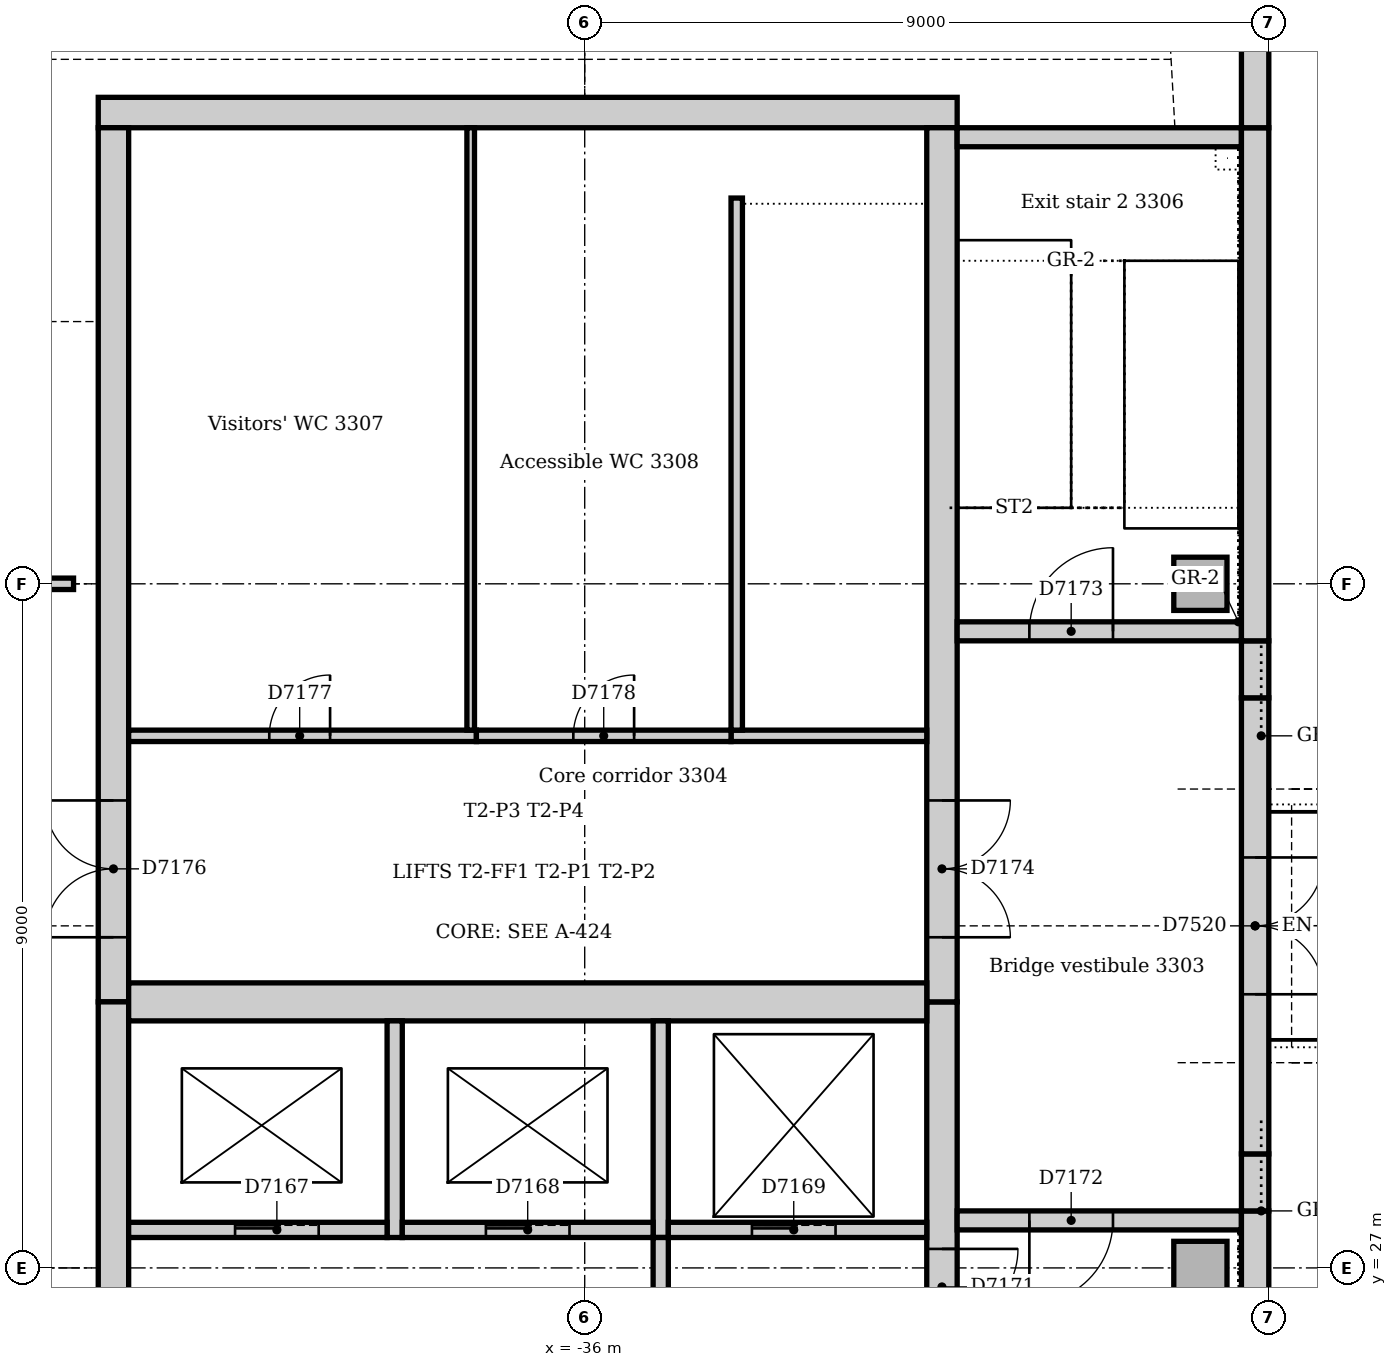
"""IFC4 building model, lengths in metres.
Left out: names, types, materials, properties, quantities, classifications, styles, units other than length and angle.
Written with IfcOpenShell. Run it as: python <this file> out.ifc"""

import sys

from ifc_helpers import new_model, si_unit, direction, frame, frame_2d, origin, origin_2d, place, context, subcontext, project, spatial, rectangle, extrude, element, fill, save


model = new_model("IFC4")
c1 = context("Model", 3, precision=1e-05, world=origin(), true_north=direction((0.0, 1.0)))
c2 = subcontext(c1, "Body", "Model", "MODEL_VIEW")
j1 = project(units=[si_unit("LENGTHUNIT", "METRE"), si_unit("PLANEANGLEUNIT", "RADIAN")], contexts=[c1])
p1 = place(None, origin())
s1 = spatial("IfcSite", under=j1, at=p1, CompositionType="ELEMENT")
p2 = place(p1, origin())
s2 = spatial("IfcBuilding", under=s1, at=p2, CompositionType="ELEMENT")
p3 = place(p2, frame((0.0, 0.0, 140.0)))
s3 = spatial("IfcBuildingStorey", under=s2, at=p3, CompositionType="ELEMENT", Elevation=140.0)
p4 = place(p3, frame((-31.1, 42.2, 0.0), z_axis=(0.0, 0.0, 1.0), x_axis=(-1.0, 0.0, 0.0)))
e1 = element("IfcWall", 1, at=p4, inside=s3, PredefinedType="SOLIDWALL", context=c2, shape_type="SweptSolid", body=[
    extrude(rectangle(XDim=11.3, YDim=0.4, at=frame_2d((5.65, 0.0))), origin(), (0.0, 0.0, 1.0), 3.7),
])
p5 = place(p3, frame((-31.3, 21.0, 0.0), z_axis=(0.0, 0.0, 1.0), x_axis=(0.0, 1.0, 0.0)))
e2 = element("IfcWall", 2, at=p5, inside=s3, PredefinedType="SOLIDWALL", context=c2, shape_type="SweptSolid", body=[
    extrude(rectangle(XDim=9.5, YDim=0.4, at=frame_2d((4.75, 0.0))), origin(), (0.0, 0.0, 1.0), 3.7),
])
p6 = place(p5, frame((5.25, 0.0, 0.0)))
e3 = element("IfcOpeningElement", 3, at=p6, cuts=e2, PredefinedType="OPENING", context=c2, shape_type="SweptSolid", body=[
    extrude(rectangle(XDim=1.0, YDim=2.1, at=frame_2d((0.5, 1.05))), frame((0.0, 0.21, 0.0), z_axis=(0.0, -1.0, 0.0), x_axis=(1.0, 0.0, 0.0)), (0.0, 0.0, 1.0), 0.42),
])
p7 = place(p3, frame((-31.3, 30.5, 0.0), z_axis=(0.0, 0.0, 1.0), x_axis=(0.0, 1.0, 0.0)))
e4 = element("IfcWall", 4, at=p7, inside=s3, PredefinedType="SOLIDWALL", context=c2, shape_type="SweptSolid", body=[
    extrude(rectangle(XDim=11.5, YDim=0.4, at=frame_2d((5.75, 0.0))), origin(), (0.0, 0.0, 1.0), 3.7),
])
p8 = place(p7, frame((0.85, 0.0, 0.0)))
e5 = element("IfcOpeningElement", 5, at=p8, cuts=e4, PredefinedType="OPENING", context=c2, shape_type="SweptSolid", body=[
    extrude(rectangle(XDim=1.8, YDim=2.1, at=frame_2d((0.9, 1.05))), frame((0.0, 0.21, 0.0), z_axis=(0.0, -1.0, 0.0), x_axis=(1.0, 0.0, 0.0)), (0.0, 0.0, 1.0), 0.42),
])
p9 = place(p3, frame((-42.2, 42.0, 0.0), z_axis=(0.0, 0.0, 1.0), x_axis=(0.0, -1.0, 0.0)))
e6 = element("IfcWall", 6, at=p9, inside=s3, PredefinedType="SOLIDWALL", context=c2, shape_type="SweptSolid", body=[
    extrude(rectangle(XDim=11.5, YDim=0.4, at=frame_2d((5.75, 0.0))), origin(), (0.0, 0.0, 1.0), 3.7),
])
p10 = place(p9, frame((8.85, 0.0, 0.0)))
e7 = element("IfcOpeningElement", 7, at=p10, cuts=e6, PredefinedType="OPENING", context=c2, shape_type="SweptSolid", body=[
    extrude(rectangle(XDim=1.8, YDim=2.1, at=frame_2d((0.9, 1.05))), frame((0.0, 0.21, 0.0), z_axis=(0.0, -1.0, 0.0), x_axis=(1.0, 0.0, 0.0)), (0.0, 0.0, 1.0), 0.42),
])
p11 = place(p3, frame((-42.2, 30.5, 0.0), z_axis=(0.0, 0.0, 1.0), x_axis=(0.0, -1.0, 0.0)))
e8 = element("IfcWall", 8, at=p11, inside=s3, PredefinedType="SOLIDWALL", context=c2, shape_type="SweptSolid", body=[
    extrude(rectangle(XDim=9.5, YDim=0.4, at=frame_2d((4.75, 0.0))), origin(), (0.0, 0.0, 1.0), 3.7),
])
p12 = place(p11, frame((3.85, 0.0, 0.0)))
e9 = element("IfcOpeningElement", 9, at=p12, cuts=e8, PredefinedType="OPENING", context=c2, shape_type="SweptSolid", body=[
    extrude(rectangle(XDim=1.8, YDim=2.1, at=frame_2d((0.9, 1.05))), frame((0.0, 0.21, 0.0), z_axis=(0.0, -1.0, 0.0), x_axis=(1.0, 0.0, 0.0)), (0.0, 0.0, 1.0), 0.42),
])
p13 = place(p3, frame((-42.0, 30.5, 0.0), z_axis=(0.0, 0.0, 1.0), x_axis=(1.0, 0.0, 0.0)))
e10 = element("IfcWall", 10, at=p13, inside=s3, PredefinedType="SOLIDWALL", context=c2, shape_type="SweptSolid", body=[
    extrude(rectangle(XDim=10.5, YDim=0.5, at=frame_2d((5.25, 0.0))), origin(), (0.0, 0.0, 1.0), 3.7),
])
p14 = place(p3, frame((-27.36, 27.625, 0.0), z_axis=(0.0, 0.0, 1.0), x_axis=(-1.0, 0.0, 0.0)))
e11 = element("IfcWall", 11, at=p14, inside=s3, PredefinedType="SOLIDWALL", context=c2, shape_type="SweptSolid", body=[
    extrude(rectangle(XDim=3.74, YDim=0.25, at=frame_2d((1.87, 0.0))), origin(), (0.0, 0.0, 1.0), 3.7),
])
p15 = place(p14, frame((1.69, 0.0, 0.0)))
e12 = element("IfcOpeningElement", 12, at=p15, cuts=e11, PredefinedType="OPENING", context=c2, shape_type="SweptSolid", body=[
    extrude(rectangle(XDim=1.1, YDim=2.1, at=frame_2d((0.55, 1.05))), frame((0.0, 0.135, 0.0), z_axis=(0.0, -1.0, 0.0), x_axis=(1.0, 0.0, 0.0)), (0.0, 0.0, 1.0), 0.27),
])
p16 = place(p3, frame((-31.1, 35.375, 0.0), z_axis=(0.0, 0.0, 1.0), x_axis=(1.0, 0.0, 0.0)))
e13 = element("IfcWall", 13, at=p16, inside=s3, PredefinedType="SOLIDWALL", context=c2, shape_type="SweptSolid", body=[
    extrude(rectangle(XDim=3.74, YDim=0.25, at=frame_2d((1.87, 0.0))), origin(), (0.0, 0.0, 1.0), 3.7),
])
p17 = place(p16, frame((0.95, 0.0, 0.0)))
e14 = element("IfcOpeningElement", 14, at=p17, cuts=e13, PredefinedType="OPENING", context=c2, shape_type="SweptSolid", body=[
    extrude(rectangle(XDim=1.1, YDim=2.1, at=frame_2d((0.55, 1.05))), frame((0.0, 0.135, 0.0), z_axis=(0.0, -1.0, 0.0), x_axis=(1.0, 0.0, 0.0)), (0.0, 0.0, 1.0), 0.27),
])
p18 = place(p3, frame((-27.36, 41.875, 0.0), z_axis=(0.0, 0.0, 1.0), x_axis=(-1.0, 0.0, 0.0)))
e15 = element("IfcWall", 15, at=p18, inside=s3, PredefinedType="SOLIDWALL", context=c2, shape_type="SweptSolid", body=[
    extrude(rectangle(XDim=3.74, YDim=0.25, at=frame_2d((1.87, 0.0))), origin(), (0.0, 0.0, 1.0), 3.7),
])
for number, where, z_axis, x_axis in (
    (16, (-27.9, 27.0, 0.0), (0.0, 0.0, 1.0), (1.0, 0.0, 0.0)),
    (17, (-27.9, 36.0, 0.0), (0.0, 0.0, 1.0), (1.0, 0.0, 0.0)),
):
    element("IfcColumn", number, at=place(p3, frame(where, z_axis=z_axis, x_axis=x_axis)), inside=s3, PredefinedType="COLUMN", context=c2, shape_type="SweptSolid", body=[
        extrude(rectangle(XDim=0.7, YDim=0.7, at=origin_2d()), origin(), (0.0, 0.0, 1.0), 4.0),
    ])
p19 = place(p3, frame((-27.18, 21.0, 0.0), z_axis=(0.0, 0.0, 1.0), x_axis=(0.0, 1.0, 0.0)))
e18 = element("IfcWall", 18, at=p19, inside=s3, PredefinedType="STANDARD", context=c2, shape_type="SweptSolid", body=[
    extrude(rectangle(XDim=6.75, YDim=0.36, at=frame_2d((3.375, 0.0))), origin(), (0.0, 0.0, 1.0), 3.7),
])
p20 = place(p3, frame((-27.18, 27.75, 0.0), z_axis=(0.0, 0.0, 1.0), x_axis=(0.0, 1.0, 0.0)))
e19 = element("IfcWall", 19, at=p20, inside=s3, PredefinedType="STANDARD", context=c2, shape_type="SweptSolid", body=[
    extrude(rectangle(XDim=0.75, YDim=0.36, at=frame_2d((0.375, 0.0))), origin(), (0.0, 0.0, 1.0), 3.7),
])
p21 = place(p3, frame((-27.18, 28.5, 0.0), z_axis=(0.0, 0.0, 1.0), x_axis=(0.0, 1.0, 0.0)))
e20 = element("IfcWall", 20, at=p21, inside=s3, PredefinedType="STANDARD", context=c2, shape_type="SweptSolid", body=[
    extrude(rectangle(XDim=6.0, YDim=0.36, at=frame_2d((3.0, 0.0))), origin(), (0.0, 0.0, 1.0), 3.7),
])
p22 = place(p21, frame((2.1, 0.0, 0.0)))
e21 = element("IfcOpeningElement", 21, at=p22, cuts=e20, PredefinedType="OPENING", context=c2, shape_type="SweptSolid", body=[
    extrude(rectangle(XDim=1.8, YDim=2.4, at=frame_2d((0.9, 1.2))), frame((0.0, 0.19, 0.0), z_axis=(0.0, -1.0, 0.0), x_axis=(1.0, 0.0, 0.0)), (0.0, 0.0, 1.0), 0.38),
])
p23 = place(p3, frame((-27.18, 34.5, 0.0), z_axis=(0.0, 0.0, 1.0), x_axis=(0.0, 1.0, 0.0)))
e22 = element("IfcWall", 22, at=p23, inside=s3, PredefinedType="STANDARD", context=c2, shape_type="SweptSolid", body=[
    extrude(rectangle(XDim=0.75, YDim=0.36, at=frame_2d((0.375, 0.0))), origin(), (0.0, 0.0, 1.0), 3.7),
])
p24 = place(p3, frame((-27.18, 35.25, 0.0), z_axis=(0.0, 0.0, 1.0), x_axis=(0.0, 1.0, 0.0)))
e23 = element("IfcWall", 23, at=p24, inside=s3, PredefinedType="STANDARD", context=c2, shape_type="SweptSolid", body=[
    extrude(rectangle(XDim=6.75, YDim=0.36, at=frame_2d((3.375, 0.0))), origin(), (0.0, 0.0, 1.0), 3.7),
])
p25 = place(p3, frame((-27.18, 42.0, 0.0), z_axis=(0.0, 0.0, 1.0), x_axis=(0.0, 1.0, 0.0)))
e24 = element("IfcWall", 24, at=p25, inside=s3, PredefinedType="STANDARD", context=c2, shape_type="SweptSolid", body=[
    extrude(rectangle(XDim=3.257, YDim=0.36, at=frame_2d((1.629, 0.0))), origin(), (0.0, 0.0, 1.0), 3.7),
])
p26 = place(p3, frame((-38.5, 27.4, 0.0), z_axis=(0.0, 0.0, 1.0), x_axis=(0.0, 1.0, 0.0)))
e25 = element("IfcWall", 25, at=p26, inside=s3, PredefinedType="SOLIDWALL", context=c2, shape_type="SweptSolid", body=[
    extrude(rectangle(XDim=2.85, YDim=0.2, at=frame_2d((1.425, 0.0))), origin(), (0.0, 0.0, 1.0), 3.55),
])
p27 = place(p3, frame((-42.0, 27.5, 0.0), z_axis=(0.0, 0.0, 1.0), x_axis=(1.0, 0.0, 0.0)))
e26 = element("IfcWall", 26, at=p27, inside=s3, PredefinedType="SOLIDWALL", context=c2, shape_type="SweptSolid", body=[
    extrude(rectangle(XDim=3.4, YDim=0.2, at=frame_2d((1.7, 0.0))), origin(), (0.0, 0.0, 1.0), 3.55),
])
p28 = place(p27, frame((1.4, 0.0, 0.0)))
e27 = element("IfcOpeningElement", 27, at=p28, cuts=e26, PredefinedType="OPENING", context=c2, shape_type="SweptSolid", body=[
    extrude(rectangle(XDim=1.1, YDim=2.1, at=frame_2d((0.55, 1.05))), frame((0.0, 0.11, 0.0), z_axis=(0.0, -1.0, 0.0), x_axis=(1.0, 0.0, 0.0)), (0.0, 0.0, 1.0), 0.22),
])
p29 = place(p3, frame((-35.0, 27.4, 0.0), z_axis=(0.0, 0.0, 1.0), x_axis=(0.0, 1.0, 0.0)))
e28 = element("IfcWall", 28, at=p29, inside=s3, PredefinedType="SOLIDWALL", context=c2, shape_type="SweptSolid", body=[
    extrude(rectangle(XDim=2.85, YDim=0.2, at=frame_2d((1.425, 0.0))), origin(), (0.0, 0.0, 1.0), 3.55),
])
p30 = place(p3, frame((-38.4, 27.5, 0.0), z_axis=(0.0, 0.0, 1.0), x_axis=(1.0, 0.0, 0.0)))
e29 = element("IfcWall", 29, at=p30, inside=s3, PredefinedType="SOLIDWALL", context=c2, shape_type="SweptSolid", body=[
    extrude(rectangle(XDim=3.3, YDim=0.2, at=frame_2d((1.65, 0.0))), origin(), (0.0, 0.0, 1.0), 3.55),
])
p31 = place(p30, frame((1.1, 0.0, 0.0)))
e30 = element("IfcOpeningElement", 30, at=p31, cuts=e29, PredefinedType="OPENING", context=c2, shape_type="SweptSolid", body=[
    extrude(rectangle(XDim=1.1, YDim=2.1, at=frame_2d((0.55, 1.05))), frame((0.0, 0.11, 0.0), z_axis=(0.0, -1.0, 0.0), x_axis=(1.0, 0.0, 0.0)), (0.0, 0.0, 1.0), 0.22),
])
p32 = place(p3, frame((-34.9, 27.5, 0.0), z_axis=(0.0, 0.0, 1.0), x_axis=(1.0, 0.0, 0.0)))
e31 = element("IfcWall", 31, at=p32, inside=s3, PredefinedType="SOLIDWALL", context=c2, shape_type="SweptSolid", body=[
    extrude(rectangle(XDim=3.4, YDim=0.2, at=frame_2d((1.7, 0.0))), origin(), (0.0, 0.0, 1.0), 3.55),
])
p33 = place(p32, frame((1.1, 0.0, 0.0)))
e32 = element("IfcOpeningElement", 32, at=p33, cuts=e31, PredefinedType="OPENING", context=c2, shape_type="SweptSolid", body=[
    extrude(rectangle(XDim=1.1, YDim=2.1, at=frame_2d((0.55, 1.05))), frame((0.0, 0.11, 0.0), z_axis=(0.0, -1.0, 0.0), x_axis=(1.0, 0.0, 0.0)), (0.0, 0.0, 1.0), 0.22),
])
p34 = place(p3, frame((-35.0, 24.1, 0.0), z_axis=(0.0, 0.0, 1.0), x_axis=(0.0, 1.0, 0.0)))
e33 = element("IfcWall", 33, at=p34, inside=s3, PredefinedType="SOLIDWALL", context=c2, shape_type="SweptSolid", body=[
    extrude(rectangle(XDim=3.3, YDim=0.2, at=frame_2d((1.65, 0.0))), origin(), (0.0, 0.0, 1.0), 3.55),
])
p35 = place(p34, frame((1.15, 0.0, 0.0)))
e34 = element("IfcOpeningElement", 34, at=p35, cuts=e33, PredefinedType="OPENING", context=c2, shape_type="SweptSolid", body=[
    extrude(rectangle(XDim=1.0, YDim=2.1, at=frame_2d((0.5, 1.05))), frame((0.0, 0.11, 0.0), z_axis=(0.0, -1.0, 0.0), x_axis=(1.0, 0.0, 0.0)), (0.0, 0.0, 1.0), 0.22),
])
p36 = place(p3, frame((-34.075, 34.0, 0.0), z_axis=(0.0, 0.0, 1.0), x_axis=(1.0, 0.0, 0.0)))
e35 = element("IfcWall", 35, at=p36, inside=s3, PredefinedType="SOLIDWALL", context=c2, shape_type="SweptSolid", body=[
    extrude(rectangle(XDim=2.575, YDim=0.15, at=frame_2d((1.288, 0.0))), origin(), (0.0, 0.0, 1.0), 3.55),
])
p37 = place(p3, frame((-34.0, 41.075, 0.0), z_axis=(0.0, 0.0, 1.0), x_axis=(0.0, -1.0, 0.0)))
e36 = element("IfcWall", 36, at=p37, inside=s3, PredefinedType="SOLIDWALL", context=c2, shape_type="SweptSolid", body=[
    extrude(rectangle(XDim=7.0, YDim=0.15, at=frame_2d((3.5, 0.0))), origin(), (0.0, 0.0, 1.0), 3.55),
])
p38 = place(p3, frame((-37.425, 34.0, 0.0), z_axis=(0.0, 0.0, 1.0), x_axis=(-1.0, 0.0, 0.0)))
e37 = element("IfcWall", 37, at=p38, inside=s3, PredefinedType="PARTITIONING", context=c2, shape_type="SweptSolid", body=[
    extrude(rectangle(XDim=4.575, YDim=0.15, at=frame_2d((2.288, 0.0))), origin(), (0.0, 0.0, 1.0), 3.55),
])
p39 = place(p38, frame((1.925, 0.0, 0.0)))
e38 = element("IfcOpeningElement", 38, at=p39, cuts=e37, PredefinedType="OPENING", context=c2, shape_type="SweptSolid", body=[
    extrude(rectangle(XDim=0.8, YDim=2.1, at=frame_2d((0.4, 1.05))), frame((0.0, 0.085, 0.0), z_axis=(0.0, -1.0, 0.0), x_axis=(1.0, 0.0, 0.0)), (0.0, 0.0, 1.0), 0.17),
])
p40 = place(p3, frame((-34.075, 34.0, 0.0), z_axis=(0.0, 0.0, 1.0), x_axis=(-1.0, 0.0, 0.0)))
e39 = element("IfcWall", 39, at=p40, inside=s3, PredefinedType="PARTITIONING", context=c2, shape_type="SweptSolid", body=[
    extrude(rectangle(XDim=3.35, YDim=0.15, at=frame_2d((1.675, 0.0))), origin(), (0.0, 0.0, 1.0), 3.55),
])
p41 = place(p40, frame((1.275, 0.0, 0.0)))
e40 = element("IfcOpeningElement", 40, at=p41, cuts=e39, PredefinedType="OPENING", context=c2, shape_type="SweptSolid", body=[
    extrude(rectangle(XDim=0.8, YDim=2.1, at=frame_2d((0.4, 1.05))), frame((0.0, 0.085, 0.0), z_axis=(0.0, -1.0, 0.0), x_axis=(1.0, 0.0, 0.0)), (0.0, 0.0, 1.0), 0.17),
])
p42 = place(p3, frame((-37.5, 34.075, 0.0), z_axis=(0.0, 0.0, 1.0), x_axis=(0.0, 1.0, 0.0)))
e41 = element("IfcWall", 41, at=p42, inside=s3, PredefinedType="PARTITIONING", context=c2, shape_type="SweptSolid", body=[
    extrude(rectangle(XDim=7.925, YDim=0.1, at=frame_2d((3.962, 0.0))), origin(), (0.0, 0.0, 1.0), 3.55),
])
p43 = place(p3, frame((-44.7, 36.0, 0.0), z_axis=(0.0, 0.0, 1.0), x_axis=(1.0, 0.0, 0.0)))
e42 = element("IfcWall", 42, at=p43, inside=s3, PredefinedType="PARTITIONING", context=c2, shape_type="SweptSolid", body=[
    extrude(rectangle(XDim=1.975, YDim=0.15, at=frame_2d((0.988, 0.0))), origin(), (0.0, 0.0, 1.0), 3.302),
])
p44 = place(p43, frame((0.55, 0.0, 0.0)))
e43 = element("IfcOpeningElement", 43, at=p44, cuts=e42, PredefinedType="OPENING", context=c2, shape_type="SweptSolid", body=[
    extrude(rectangle(XDim=0.9, YDim=2.1, at=frame_2d((0.45, 1.05))), frame((0.0, 0.085, 0.0), z_axis=(0.0, -1.0, 0.0), x_axis=(1.0, 0.0, 0.0)), (0.0, 0.0, 1.0), 0.17),
])
p45 = place(p22, frame((1.8, 0.0, 0.0), z_axis=(0.0, 0.0, 1.0), x_axis=(-1.0, 0.0, 0.0)))
e44 = element("IfcDoor", 44, at=p45, inside=s3, OperationType="DOUBLE_DOOR_SINGLE_SWING", PredefinedType="DOOR", context=c2, shape_type="SweptSolid", body=[
    extrude(rectangle(XDim=1.8, YDim=2.4, at=frame_2d((0.9, 1.2))), frame((0.0, -0.07, 0.0), z_axis=(0.0, -1.0, 0.0), x_axis=(1.0, 0.0, 0.0)), (0.0, 0.0, 1.0), 0.05),
])
fill(e21, e44)
p46 = place(p28, origin())
e45 = element("IfcDoor", 45, at=p46, inside=s3, OperationType="SLIDING_TO_LEFT", PredefinedType="DOOR", context=c2, shape_type="SweptSolid", body=[
    extrude(rectangle(XDim=1.1, YDim=2.1, at=frame_2d((0.55, 1.05))), frame((0.0, 0.025, 0.0), z_axis=(0.0, -1.0, 0.0), x_axis=(1.0, 0.0, 0.0)), (0.0, 0.0, 1.0), 0.05),
])
fill(e27, e45)
p47 = place(p31, origin())
e46 = element("IfcDoor", 46, at=p47, inside=s3, OperationType="SLIDING_TO_LEFT", PredefinedType="DOOR", context=c2, shape_type="SweptSolid", body=[
    extrude(rectangle(XDim=1.1, YDim=2.1, at=frame_2d((0.55, 1.05))), frame((0.0, 0.025, 0.0), z_axis=(0.0, -1.0, 0.0), x_axis=(1.0, 0.0, 0.0)), (0.0, 0.0, 1.0), 0.05),
])
fill(e30, e46)
p48 = place(p33, origin())
e47 = element("IfcDoor", 47, at=p48, inside=s3, OperationType="SLIDING_TO_LEFT", PredefinedType="DOOR", context=c2, shape_type="SweptSolid", body=[
    extrude(rectangle(XDim=1.1, YDim=2.1, at=frame_2d((0.55, 1.05))), frame((0.0, 0.025, 0.0), z_axis=(0.0, -1.0, 0.0), x_axis=(1.0, 0.0, 0.0)), (0.0, 0.0, 1.0), 0.05),
])
fill(e32, e47)
p49 = place(p6, frame((1.0, 0.0, 0.0), z_axis=(0.0, 0.0, 1.0), x_axis=(-1.0, 0.0, 0.0)))
e48 = element("IfcDoor", 48, at=p49, inside=s3, OperationType="SINGLE_SWING_LEFT", PredefinedType="DOOR", context=c2, shape_type="SweptSolid", body=[
    extrude(rectangle(XDim=1.0, YDim=2.1, at=frame_2d((0.5, 1.05))), frame((0.0, 0.025, 0.0), z_axis=(0.0, -1.0, 0.0), x_axis=(1.0, 0.0, 0.0)), (0.0, 0.0, 1.0), 0.05),
])
fill(e3, e48)
p50 = place(p15, origin())
e49 = element("IfcDoor", 49, at=p50, inside=s3, OperationType="SINGLE_SWING_RIGHT", PredefinedType="DOOR", context=c2, shape_type="SweptSolid", body=[
    extrude(rectangle(XDim=1.1, YDim=2.1, at=frame_2d((0.55, 1.05))), frame((0.0, 0.025, 0.0), z_axis=(0.0, -1.0, 0.0), x_axis=(1.0, 0.0, 0.0)), (0.0, 0.0, 1.0), 0.05),
])
fill(e12, e49)
p51 = place(p17, origin())
e50 = element("IfcDoor", 50, at=p51, inside=s3, OperationType="SINGLE_SWING_RIGHT", PredefinedType="DOOR", context=c2, shape_type="SweptSolid", body=[
    extrude(rectangle(XDim=1.1, YDim=2.1, at=frame_2d((0.55, 1.05))), frame((0.0, 0.025, 0.0), z_axis=(0.0, -1.0, 0.0), x_axis=(1.0, 0.0, 0.0)), (0.0, 0.0, 1.0), 0.05),
])
fill(e14, e50)
p52 = place(p8, frame((1.8, 0.0, 0.0), z_axis=(0.0, 0.0, 1.0), x_axis=(-1.0, 0.0, 0.0)))
e51 = element("IfcDoor", 51, at=p52, inside=s3, OperationType="DOUBLE_DOOR_SINGLE_SWING", PredefinedType="DOOR", context=c2, shape_type="SweptSolid", body=[
    extrude(rectangle(XDim=1.8, YDim=2.1, at=frame_2d((0.9, 1.05))), frame((0.0, 0.025, 0.0), z_axis=(0.0, -1.0, 0.0), x_axis=(1.0, 0.0, 0.0)), (0.0, 0.0, 1.0), 0.05),
])
fill(e5, e51)
p53 = place(p10, frame((1.8, 0.0, 0.0), z_axis=(0.0, 0.0, 1.0), x_axis=(-1.0, 0.0, 0.0)))
e52 = element("IfcDoor", 52, at=p53, inside=s3, OperationType="DOUBLE_DOOR_SINGLE_SWING", PredefinedType="DOOR", context=c2, shape_type="SweptSolid", body=[
    extrude(rectangle(XDim=1.8, YDim=2.1, at=frame_2d((0.9, 1.05))), frame((0.0, 0.025, 0.0), z_axis=(0.0, -1.0, 0.0), x_axis=(1.0, 0.0, 0.0)), (0.0, 0.0, 1.0), 0.05),
])
fill(e7, e52)
p54 = place(p39, frame((0.8, 0.0, 0.0), z_axis=(0.0, 0.0, 1.0), x_axis=(-1.0, 0.0, 0.0)))
e53 = element("IfcDoor", 53, at=p54, inside=s3, OperationType="SINGLE_SWING_RIGHT", PredefinedType="DOOR", context=c2, shape_type="SweptSolid", body=[
    extrude(rectangle(XDim=0.8, YDim=2.1, at=frame_2d((0.4, 1.05))), frame((0.0, 0.025, 0.0), z_axis=(0.0, -1.0, 0.0), x_axis=(1.0, 0.0, 0.0)), (0.0, 0.0, 1.0), 0.05),
])
fill(e38, e53)
p55 = place(p41, frame((0.8, 0.0, 0.0), z_axis=(0.0, 0.0, 1.0), x_axis=(-1.0, 0.0, 0.0)))
e54 = element("IfcDoor", 54, at=p55, inside=s3, OperationType="SINGLE_SWING_RIGHT", PredefinedType="DOOR", context=c2, shape_type="SweptSolid", body=[
    extrude(rectangle(XDim=0.8, YDim=2.1, at=frame_2d((0.4, 1.05))), frame((0.0, 0.025, 0.0), z_axis=(0.0, -1.0, 0.0), x_axis=(1.0, 0.0, 0.0)), (0.0, 0.0, 1.0), 0.05),
])
fill(e40, e54)
save(model, sys.argv[1])
